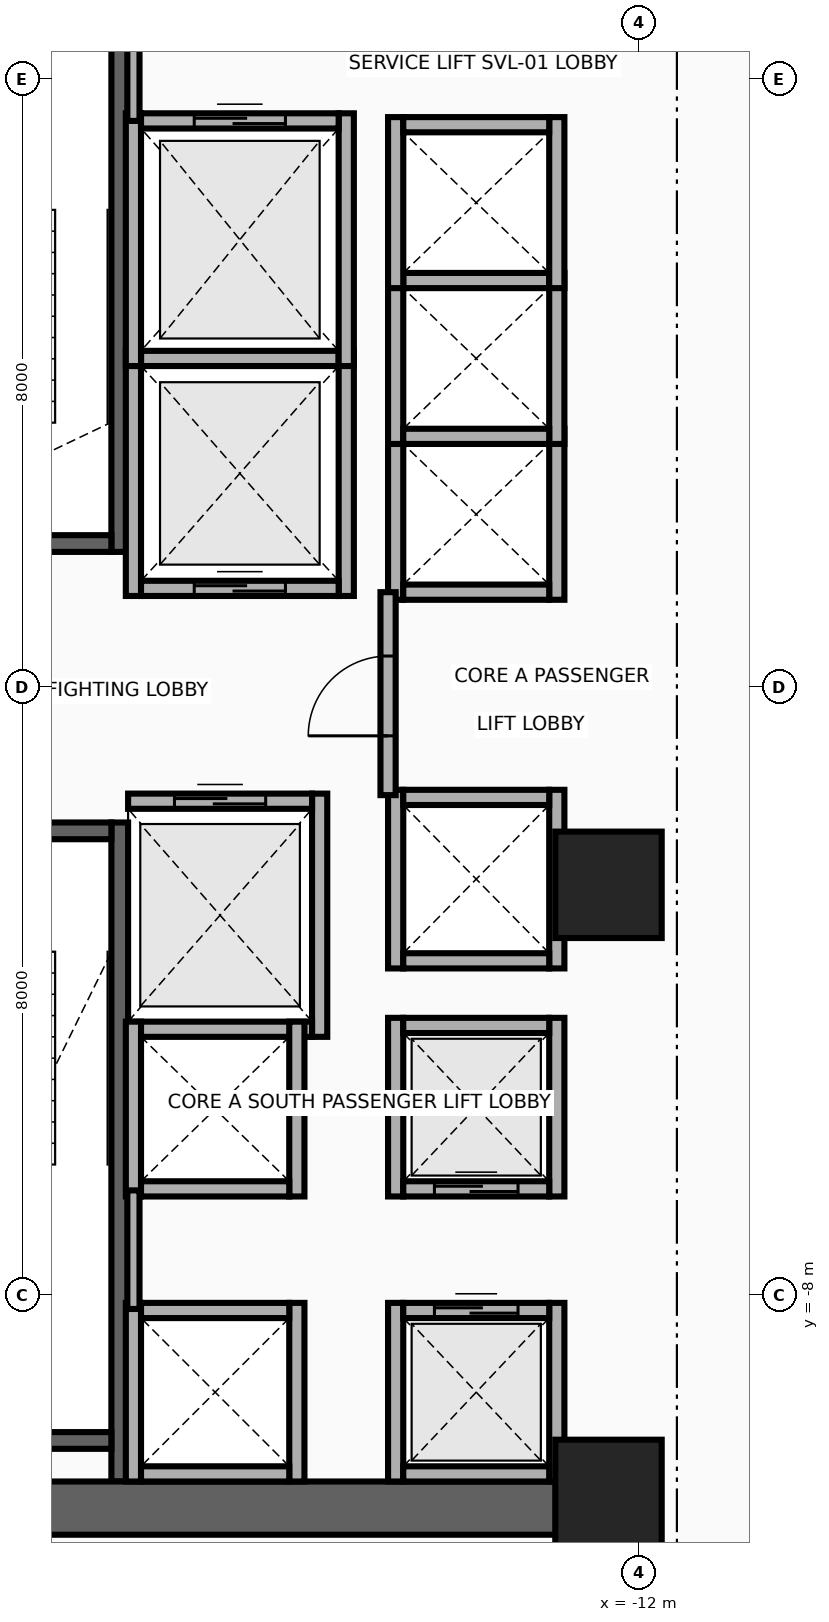
"""IFC4 building model, lengths in metres.
Left out: names, types, materials, properties, quantities, classifications, styles, units other than length and angle.
Written with IfcOpenShell. Run it as: python <this file> out.ifc"""

import sys

from ifc_helpers import new_model, si_unit, direction, frame, frame_2d, origin, origin_2d, place, context, subcontext, project, spatial, rectangle, extrude, source, transform, mapped, element, fill, save


model = new_model("IFC4")
c1 = context("Model", 3, precision=1e-05, world=origin(), true_north=direction((0.0, 1.0)))
c2 = subcontext(c1, "Body", "Model", "MODEL_VIEW")
j1 = project(units=[si_unit("LENGTHUNIT", "METRE"), si_unit("PLANEANGLEUNIT", "RADIAN")], contexts=[c1])
p1 = place(None, origin())
s1 = spatial("IfcSite", under=j1, at=p1, CompositionType="ELEMENT")
p2 = place(p1, origin())
s2 = spatial("IfcBuilding", under=s1, at=p2, CompositionType="ELEMENT")
p3 = place(p2, frame((0.0, 0.0, 48.2)))
s3 = spatial("IfcBuildingStorey", under=s2, at=p3, CompositionType="ELEMENT", Elevation=48.2)
p4 = place(p3, frame((-18.83, 1.78, 0.0), z_axis=(0.0, 0.0, 1.0), x_axis=(0.0, 1.0, 0.0)))
e1 = element("IfcWall", 1, at=p4, inside=s3, PredefinedType="SHEAR", context=c2, shape_type="SweptSolid", body=[
    extrude(rectangle(XDim=8.67, YDim=0.22, at=frame_2d((4.335, 0.0))), origin(), (0.0, 0.0, 1.0), 3.46),
])
p5 = place(p3, frame((-22.05, 1.89, 0.0), z_axis=(0.0, 0.0, 1.0), x_axis=(1.0, 0.0, 0.0)))
e2 = element("IfcWall", 2, at=p5, inside=s3, PredefinedType="SHEAR", context=c2, shape_type="SweptSolid", body=[
    extrude(rectangle(XDim=3.11, YDim=0.22, at=frame_2d((1.555, 0.0))), origin(), (0.0, 0.0, 1.0), 3.46),
])
p6 = place(p5, frame((1.0, 0.0, 0.0)))
e3 = element("IfcOpeningElement", 3, at=p6, cuts=e2, PredefinedType="OPENING", context=c2, shape_type="SweptSolid", body=[
    extrude(rectangle(XDim=1.1, YDim=2.15, at=frame_2d((0.55, 1.075))), frame((0.0, 0.125, 0.0), z_axis=(0.0, -1.0, 0.0), x_axis=(1.0, 0.0, 0.0)), (0.0, 0.0, 1.0), 0.25),
])
p7 = place(p3, frame((-18.83, -10.45, 0.0), z_axis=(0.0, 0.0, 1.0), x_axis=(0.0, 1.0, 0.0)))
e4 = element("IfcWall", 4, at=p7, inside=s3, PredefinedType="SHEAR", context=c2, shape_type="SweptSolid", body=[
    extrude(rectangle(XDim=8.67, YDim=0.22, at=frame_2d((4.335, 0.0))), origin(), (0.0, 0.0, 1.0), 3.46),
])
p8 = place(p3, frame((-22.05, -9.91, 0.0), z_axis=(0.0, 0.0, 1.0), x_axis=(1.0, 0.0, 0.0)))
e5 = element("IfcWall", 5, at=p8, inside=s3, PredefinedType="SHEAR", context=c2, shape_type="SweptSolid", body=[
    extrude(rectangle(XDim=3.11, YDim=0.22, at=frame_2d((1.555, 0.0))), origin(), (0.0, 0.0, 1.0), 3.46),
])
p9 = place(p3, frame((-22.05, -1.89, 0.0), z_axis=(0.0, 0.0, 1.0), x_axis=(1.0, 0.0, 0.0)))
e6 = element("IfcWall", 6, at=p9, inside=s3, PredefinedType="SHEAR", context=c2, shape_type="SweptSolid", body=[
    extrude(rectangle(XDim=3.11, YDim=0.22, at=frame_2d((1.555, 0.0))), origin(), (0.0, 0.0, 1.0), 3.46),
])
p10 = place(p9, frame((1.0, 0.0, 0.0)))
e7 = element("IfcOpeningElement", 7, at=p10, cuts=e6, PredefinedType="OPENING", context=c2, shape_type="SweptSolid", body=[
    extrude(rectangle(XDim=1.1, YDim=2.15, at=frame_2d((0.55, 1.075))), frame((0.0, 0.125, 0.0), z_axis=(0.0, -1.0, 0.0), x_axis=(1.0, 0.0, 0.0)), (0.0, 0.0, 1.0), 0.25),
])
p11 = place(p3, frame((-22.65, -10.8, 0.0), z_axis=(0.0, 0.0, 1.0), x_axis=(1.0, 0.0, 0.0)))
e8 = element("IfcWall", 8, at=p11, inside=s3, PredefinedType="SHEAR", context=c2, shape_type="SweptSolid", body=[
    extrude(rectangle(XDim=10.25, YDim=0.7, at=frame_2d((5.125, 0.0))), origin(), (0.0, 0.0, 1.0), 3.46),
])
m1 = source(origin(), c2, "Body", "SweptSolid", [
    extrude(rectangle(XDim=1.4, YDim=1.4, at=origin_2d()), origin(), (0.0, 0.0, 1.0), 3.7),
])
for number, where, z_axis, x_axis in (
    (9, (-12.4, -10.6, 0.0), (0.0, 0.0, 1.0), (1.0, 0.0, 0.0)),
    (10, (-12.4, -2.6, 0.0), (0.0, 0.0, 1.0), (1.0, 0.0, 0.0)),
):
    element("IfcColumn", number, at=place(p3, frame(where, z_axis=z_axis, x_axis=x_axis)), inside=s3, PredefinedType="COLUMN", context=c2, shape_type="MappedRepresentation", body=[
        mapped(m1, transform((0.0, 0.0, 0.0), x_axis=(1.0, 0.0, 0.0), y_axis=(0.0, 1.0, 0.0), z_axis=(0.0, 0.0, 1.0), scale=1.0)),
    ])
for number, where, z_axis, x_axis in (
    (11, (-18.65, 1.2, 0.0), (0.0, 0.0, 1.0), (0.0, 1.0, 0.0)),
    (12, (-15.85, 1.2, 0.0), (0.0, 0.0, 1.0), (0.0, 1.0, 0.0)),
):
    element("IfcWall", number, at=place(p3, frame(where, z_axis=z_axis, x_axis=x_axis)), inside=s3, PredefinedType="MOVABLE", context=c2, shape_type="SweptSolid", body=[
        extrude(rectangle(XDim=3.225, YDim=0.2, at=frame_2d((1.613, 0.0))), origin(), (0.0, 0.0, 1.0), 3.46),
    ])
p12 = place(p3, frame((-18.55, 1.3, 0.0), z_axis=(0.0, 0.0, 1.0), x_axis=(1.0, 0.0, 0.0)))
e13 = element("IfcWall", 13, at=p12, inside=s3, PredefinedType="MOVABLE", context=c2, shape_type="SweptSolid", body=[
    extrude(rectangle(XDim=2.6, YDim=0.2, at=frame_2d((1.3, 0.0))), origin(), (0.0, 0.0, 1.0), 3.46),
])
p13 = place(p12, frame((0.7, 0.0, 0.0)))
e14 = element("IfcOpeningElement", 14, at=p13, cuts=e13, PredefinedType="OPENING", context=c2, shape_type="SweptSolid", body=[
    extrude(rectangle(XDim=1.2, YDim=2.1, at=frame_2d((0.6, 1.05))), frame((0.0, 0.115, 0.0), z_axis=(0.0, -1.0, 0.0), x_axis=(1.0, 0.0, 0.0)), (0.0, 0.0, 1.0), 0.23),
])
p14 = place(p3, frame((-18.55, 4.325, 0.0), z_axis=(0.0, 0.0, 1.0), x_axis=(1.0, 0.0, 0.0)))
e15 = element("IfcWall", 15, at=p14, inside=s3, PredefinedType="MOVABLE", context=c2, shape_type="SweptSolid", body=[
    extrude(rectangle(XDim=2.6, YDim=0.2, at=frame_2d((1.3, 0.0))), origin(), (0.0, 0.0, 1.0), 3.46),
])
p15 = place(p3, frame((-16.2, -4.6, 0.0), z_axis=(0.0, 0.0, 1.0), x_axis=(0.0, 1.0, 0.0)))
e16 = element("IfcWall", 16, at=p15, inside=s3, PredefinedType="MOVABLE", context=c2, shape_type="SweptSolid", body=[
    extrude(rectangle(XDim=3.2, YDim=0.2, at=frame_2d((1.6, 0.0))), origin(), (0.0, 0.0, 1.0), 3.46),
])
p16 = place(p3, frame((-18.72, -4.5, 0.0), z_axis=(0.0, 0.0, 1.0), x_axis=(1.0, 0.0, 0.0)))
e17 = element("IfcWall", 17, at=p16, inside=s3, PredefinedType="MOVABLE", context=c2, shape_type="SweptSolid", body=[
    extrude(rectangle(XDim=2.42, YDim=0.2, at=frame_2d((1.21, 0.0))), origin(), (0.0, 0.0, 1.0), 3.46),
])
p17 = place(p3, frame((-18.72, -1.5, 0.0), z_axis=(0.0, 0.0, 1.0), x_axis=(1.0, 0.0, 0.0)))
e18 = element("IfcWall", 18, at=p17, inside=s3, PredefinedType="MOVABLE", context=c2, shape_type="SweptSolid", body=[
    extrude(rectangle(XDim=2.42, YDim=0.2, at=frame_2d((1.21, 0.0))), origin(), (0.0, 0.0, 1.0), 3.46),
])
p18 = place(p17, frame((0.61, 0.0, 0.0)))
e19 = element("IfcOpeningElement", 19, at=p18, cuts=e18, PredefinedType="OPENING", context=c2, shape_type="SweptSolid", body=[
    extrude(rectangle(XDim=1.2, YDim=2.1, at=frame_2d((0.6, 1.05))), frame((0.0, 0.115, 0.0), z_axis=(0.0, -1.0, 0.0), x_axis=(1.0, 0.0, 0.0)), (0.0, 0.0, 1.0), 0.23),
])
for number, where, z_axis, x_axis in (
    (20, (-18.65, 4.225, 0.0), (0.0, 0.0, 1.0), (0.0, 1.0, 0.0)),
    (21, (-15.85, 4.225, 0.0), (0.0, 0.0, 1.0), (0.0, 1.0, 0.0)),
):
    element("IfcWall", number, at=place(p3, frame(where, z_axis=z_axis, x_axis=x_axis)), inside=s3, PredefinedType="MOVABLE", context=c2, shape_type="SweptSolid", body=[
        extrude(rectangle(XDim=3.325, YDim=0.2, at=frame_2d((1.663, 0.0))), origin(), (0.0, 0.0, 1.0), 3.46),
    ])
p19 = place(p3, frame((-18.55, 7.45, 0.0), z_axis=(0.0, 0.0, 1.0), x_axis=(1.0, 0.0, 0.0)))
e22 = element("IfcWall", 22, at=p19, inside=s3, PredefinedType="MOVABLE", context=c2, shape_type="SweptSolid", body=[
    extrude(rectangle(XDim=2.6, YDim=0.2, at=frame_2d((1.3, 0.0))), origin(), (0.0, 0.0, 1.0), 3.46),
])
p20 = place(p19, frame((0.7, 0.0, 0.0)))
e23 = element("IfcOpeningElement", 23, at=p20, cuts=e22, PredefinedType="OPENING", context=c2, shape_type="SweptSolid", body=[
    extrude(rectangle(XDim=1.2, YDim=2.1, at=frame_2d((0.6, 1.05))), frame((0.0, 0.115, 0.0), z_axis=(0.0, -1.0, 0.0), x_axis=(1.0, 0.0, 0.0)), (0.0, 0.0, 1.0), 0.23),
])
for number, where, z_axis, x_axis in (
    (24, (-15.2, -10.45, 0.0), (0.0, 0.0, 1.0), (0.0, 1.0, 0.0)),
    (25, (-13.08, -10.45, 0.0), (0.0, 0.0, 1.0), (0.0, 1.0, 0.0)),
):
    element("IfcWall", number, at=place(p3, frame(where, z_axis=z_axis, x_axis=x_axis)), inside=s3, PredefinedType="MOVABLE", context=c2, shape_type="SweptSolid", body=[
        extrude(rectangle(XDim=2.35, YDim=0.2, at=frame_2d((1.175, 0.0))), origin(), (0.0, 0.0, 1.0), 2.583),
    ])
p21 = place(p3, frame((-15.1, -10.35, 0.0), z_axis=(0.0, 0.0, 1.0), x_axis=(1.0, 0.0, 0.0)))
e26 = element("IfcWall", 26, at=p21, inside=s3, PredefinedType="MOVABLE", context=c2, shape_type="SweptSolid", body=[
    extrude(rectangle(XDim=1.92, YDim=0.2, at=frame_2d((0.96, 0.0))), origin(), (0.0, 0.0, 1.0), 2.583),
])
p22 = place(p3, frame((-15.1, -8.2, 0.0), z_axis=(0.0, 0.0, 1.0), x_axis=(1.0, 0.0, 0.0)))
e27 = element("IfcWall", 27, at=p22, inside=s3, PredefinedType="MOVABLE", context=c2, shape_type="SweptSolid", body=[
    extrude(rectangle(XDim=1.92, YDim=0.2, at=frame_2d((0.96, 0.0))), origin(), (0.0, 0.0, 1.0), 3.46),
])
p23 = place(p22, frame((0.41, 0.0, 0.0)))
e28 = element("IfcOpeningElement", 28, at=p23, cuts=e27, PredefinedType="OPENING", context=c2, shape_type="SweptSolid", body=[
    extrude(rectangle(XDim=1.1, YDim=2.1, at=frame_2d((0.55, 1.05))), frame((0.0, 0.115, 0.0), z_axis=(0.0, -1.0, 0.0), x_axis=(1.0, 0.0, 0.0)), (0.0, 0.0, 1.0), 0.23),
])
for number, where, z_axis, x_axis in (
    (29, (-15.2, -6.7, 0.0), (0.0, 0.0, 1.0), (0.0, 1.0, 0.0)),
    (30, (-13.08, -6.7, 0.0), (0.0, 0.0, 1.0), (0.0, 1.0, 0.0)),
):
    element("IfcWall", number, at=place(p3, frame(where, z_axis=z_axis, x_axis=x_axis)), inside=s3, PredefinedType="MOVABLE", context=c2, shape_type="SweptSolid", body=[
        extrude(rectangle(XDim=2.35, YDim=0.2, at=frame_2d((1.175, 0.0))), origin(), (0.0, 0.0, 1.0), 3.46),
    ])
p24 = place(p3, frame((-15.1, -6.6, 0.0), z_axis=(0.0, 0.0, 1.0), x_axis=(1.0, 0.0, 0.0)))
e31 = element("IfcWall", 31, at=p24, inside=s3, PredefinedType="MOVABLE", context=c2, shape_type="SweptSolid", body=[
    extrude(rectangle(XDim=1.92, YDim=0.2, at=frame_2d((0.96, 0.0))), origin(), (0.0, 0.0, 1.0), 3.46),
])
p25 = place(p24, frame((0.41, 0.0, 0.0)))
e32 = element("IfcOpeningElement", 32, at=p25, cuts=e31, PredefinedType="OPENING", context=c2, shape_type="SweptSolid", body=[
    extrude(rectangle(XDim=1.1, YDim=2.1, at=frame_2d((0.55, 1.05))), frame((0.0, 0.115, 0.0), z_axis=(0.0, -1.0, 0.0), x_axis=(1.0, 0.0, 0.0)), (0.0, 0.0, 1.0), 0.23),
])
p26 = place(p3, frame((-15.1, -4.45, 0.0), z_axis=(0.0, 0.0, 1.0), x_axis=(1.0, 0.0, 0.0)))
e33 = element("IfcWall", 33, at=p26, inside=s3, PredefinedType="MOVABLE", context=c2, shape_type="SweptSolid", body=[
    extrude(rectangle(XDim=1.92, YDim=0.2, at=frame_2d((0.96, 0.0))), origin(), (0.0, 0.0, 1.0), 3.46),
])
for number, where, z_axis, x_axis in (
    (34, (-18.65, -10.45, 0.0), (0.0, 0.0, 1.0), (0.0, 1.0, 0.0)),
    (35, (-16.5, -10.45, 0.0), (0.0, 0.0, 1.0), (0.0, 1.0, 0.0)),
):
    element("IfcWall", number, at=place(p3, frame(where, z_axis=z_axis, x_axis=x_axis)), inside=s3, PredefinedType="MOVABLE", context=c2, shape_type="SweptSolid", body=[
        extrude(rectangle(XDim=2.35, YDim=0.2, at=frame_2d((1.175, 0.0))), origin(), (0.0, 0.0, 1.0), 2.583),
    ])
p27 = place(p3, frame((-18.55, -10.35, 0.0), z_axis=(0.0, 0.0, 1.0), x_axis=(1.0, 0.0, 0.0)))
e36 = element("IfcWall", 36, at=p27, inside=s3, PredefinedType="MOVABLE", context=c2, shape_type="SweptSolid", body=[
    extrude(rectangle(XDim=1.95, YDim=0.2, at=frame_2d((0.975, 0.0))), origin(), (0.0, 0.0, 1.0), 2.583),
])
p28 = place(p3, frame((-18.55, -8.2, 0.0), z_axis=(0.0, 0.0, 1.0), x_axis=(1.0, 0.0, 0.0)))
e37 = element("IfcWall", 37, at=p28, inside=s3, PredefinedType="MOVABLE", context=c2, shape_type="SweptSolid", body=[
    extrude(rectangle(XDim=1.95, YDim=0.2, at=frame_2d((0.975, 0.0))), origin(), (0.0, 0.0, 1.0), 3.46),
])
for number, where, z_axis, x_axis in (
    (38, (-15.2, 1.15, 0.0), (0.0, 0.0, 1.0), (0.0, 1.0, 0.0)),
    (39, (-13.08, 1.15, 0.0), (0.0, 0.0, 1.0), (0.0, 1.0, 0.0)),
):
    element("IfcWall", number, at=place(p3, frame(where, z_axis=z_axis, x_axis=x_axis)), inside=s3, PredefinedType="MOVABLE", context=c2, shape_type="SweptSolid", body=[
        extrude(rectangle(XDim=2.25, YDim=0.2, at=frame_2d((1.125, 0.0))), origin(), (0.0, 0.0, 1.0), 3.46),
    ])
p29 = place(p3, frame((-15.1, 1.25, 0.0), z_axis=(0.0, 0.0, 1.0), x_axis=(1.0, 0.0, 0.0)))
e40 = element("IfcWall", 40, at=p29, inside=s3, PredefinedType="MOVABLE", context=c2, shape_type="SweptSolid", body=[
    extrude(rectangle(XDim=1.92, YDim=0.2, at=frame_2d((0.96, 0.0))), origin(), (0.0, 0.0, 1.0), 3.46),
])
for number, where, z_axis, x_axis in (
    (41, (-15.2, 3.2, 0.0), (0.0, 0.0, 1.0), (0.0, 1.0, 0.0)),
    (42, (-13.08, 3.2, 0.0), (0.0, 0.0, 1.0), (0.0, 1.0, 0.0)),
):
    element("IfcWall", number, at=place(p3, frame(where, z_axis=z_axis, x_axis=x_axis)), inside=s3, PredefinedType="MOVABLE", context=c2, shape_type="SweptSolid", body=[
        extrude(rectangle(XDim=2.25, YDim=0.2, at=frame_2d((1.125, 0.0))), origin(), (0.0, 0.0, 1.0), 3.46),
    ])
for number, where, z_axis, x_axis in (
    (43, (-15.1, 3.3, 0.0), (0.0, 0.0, 1.0), (1.0, 0.0, 0.0)),
    (44, (-15.1, 5.35, 0.0), (0.0, 0.0, 1.0), (1.0, 0.0, 0.0)),
):
    element("IfcWall", number, at=place(p3, frame(where, z_axis=z_axis, x_axis=x_axis)), inside=s3, PredefinedType="MOVABLE", context=c2, shape_type="SweptSolid", body=[
        extrude(rectangle(XDim=1.92, YDim=0.2, at=frame_2d((0.96, 0.0))), origin(), (0.0, 0.0, 1.0), 3.46),
    ])
for number, where, z_axis, x_axis in (
    (45, (-15.2, 5.25, 0.0), (0.0, 0.0, 1.0), (0.0, 1.0, 0.0)),
    (46, (-13.08, 5.25, 0.0), (0.0, 0.0, 1.0), (0.0, 1.0, 0.0)),
):
    element("IfcWall", number, at=place(p3, frame(where, z_axis=z_axis, x_axis=x_axis)), inside=s3, PredefinedType="MOVABLE", context=c2, shape_type="SweptSolid", body=[
        extrude(rectangle(XDim=2.25, YDim=0.2, at=frame_2d((1.125, 0.0))), origin(), (0.0, 0.0, 1.0), 3.46),
    ])
p30 = place(p3, frame((-15.1, 7.4, 0.0), z_axis=(0.0, 0.0, 1.0), x_axis=(1.0, 0.0, 0.0)))
e47 = element("IfcWall", 47, at=p30, inside=s3, PredefinedType="MOVABLE", context=c2, shape_type="SweptSolid", body=[
    extrude(rectangle(XDim=1.92, YDim=0.2, at=frame_2d((0.96, 0.0))), origin(), (0.0, 0.0, 1.0), 3.46),
])
for number, where, z_axis, x_axis in (
    (48, (-18.65, -6.7, 0.0), (0.0, 0.0, 1.0), (0.0, 1.0, 0.0)),
    (49, (-16.5, -6.7, 0.0), (0.0, 0.0, 1.0), (0.0, 1.0, 0.0)),
):
    element("IfcWall", number, at=place(p3, frame(where, z_axis=z_axis, x_axis=x_axis)), inside=s3, PredefinedType="MOVABLE", context=c2, shape_type="SweptSolid", body=[
        extrude(rectangle(XDim=2.3, YDim=0.2, at=frame_2d((1.15, 0.0))), origin(), (0.0, 0.0, 1.0), 3.46),
    ])
p31 = place(p3, frame((-18.55, -6.6, 0.0), z_axis=(0.0, 0.0, 1.0), x_axis=(1.0, 0.0, 0.0)))
e50 = element("IfcWall", 50, at=p31, inside=s3, PredefinedType="MOVABLE", context=c2, shape_type="SweptSolid", body=[
    extrude(rectangle(XDim=1.95, YDim=0.2, at=frame_2d((0.975, 0.0))), origin(), (0.0, 0.0, 1.0), 3.46),
])
for number, where, z_axis, x_axis in (
    (51, (-15.2, -3.7, 0.0), (0.0, 0.0, 1.0), (0.0, 1.0, 0.0)),
    (52, (-13.08, -3.7, 0.0), (0.0, 0.0, 1.0), (0.0, 1.0, 0.0)),
):
    element("IfcWall", number, at=place(p3, frame(where, z_axis=z_axis, x_axis=x_axis)), inside=s3, PredefinedType="MOVABLE", context=c2, shape_type="SweptSolid", body=[
        extrude(rectangle(XDim=2.35, YDim=0.2, at=frame_2d((1.175, 0.0))), origin(), (0.0, 0.0, 1.0), 3.46),
    ])
for number, where, z_axis, x_axis in (
    (53, (-15.1, -3.6, 0.0), (0.0, 0.0, 1.0), (1.0, 0.0, 0.0)),
    (54, (-15.1, -1.45, 0.0), (0.0, 0.0, 1.0), (1.0, 0.0, 0.0)),
):
    element("IfcWall", number, at=place(p3, frame(where, z_axis=z_axis, x_axis=x_axis)), inside=s3, PredefinedType="MOVABLE", context=c2, shape_type="SweptSolid", body=[
        extrude(rectangle(XDim=1.92, YDim=0.2, at=frame_2d((0.96, 0.0))), origin(), (0.0, 0.0, 1.0), 3.46),
    ])
p32 = place(p3, frame((-15.3, -1.42, 0.0), z_axis=(0.0, 0.0, 1.0), x_axis=(0.0, 1.0, 0.0)))
e55 = element("IfcWall", 55, at=p32, inside=s3, PredefinedType="PARTITIONING", context=c2, shape_type="SweptSolid", body=[
    extrude(rectangle(XDim=2.67, YDim=0.2, at=frame_2d((1.335, 0.0))), origin(), (0.0, 0.0, 1.0), 3.46),
])
p33 = place(p32, frame((0.78, 0.0, 0.0)))
e56 = element("IfcOpeningElement", 56, at=p33, cuts=e55, PredefinedType="OPENING", context=c2, shape_type="SweptSolid", body=[
    extrude(rectangle(XDim=1.05, YDim=2.15, at=frame_2d((0.525, 1.075))), frame((0.0, 0.115, 0.0), z_axis=(0.0, -1.0, 0.0), x_axis=(1.0, 0.0, 0.0)), (0.0, 0.0, 1.0), 0.23),
])
p34 = place(p3, frame((-18.65, 7.45, 0.0), z_axis=(0.0, 0.0, 1.0), x_axis=(0.0, 1.0, 0.0)))
e57 = element("IfcWall", 57, at=p34, inside=s3, PredefinedType="PARTITIONING", context=c2, shape_type="SweptSolid", body=[
    extrude(rectangle(XDim=2.93, YDim=0.16, at=frame_2d((1.465, 0.0))), origin(), (0.0, 0.0, 1.0), 3.46),
])
p35 = place(p3, frame((-18.65, -8.18, 0.0), z_axis=(0.0, 0.0, 1.0), x_axis=(0.0, 1.0, 0.0)))
e58 = element("IfcWall", 58, at=p35, inside=s3, PredefinedType="PARTITIONING", context=c2, shape_type="SweptSolid", body=[
    extrude(rectangle(XDim=1.56, YDim=0.16, at=frame_2d((0.78, 0.0))), origin(), (0.0, 0.0, 1.0), 3.46),
])
p36 = place(p13, origin())
e59 = element("IfcDoor", 59, at=p36, inside=s3, OperationType="DOUBLE_DOOR_SLIDING", PredefinedType="DOOR", context=c2, shape_type="SweptSolid", body=[
    extrude(rectangle(XDim=1.2, YDim=2.1, at=frame_2d((0.6, 1.05))), frame((0.0, 0.025, 0.0), z_axis=(0.0, -1.0, 0.0), x_axis=(1.0, 0.0, 0.0)), (0.0, 0.0, 1.0), 0.05),
])
fill(e14, e59)
p37 = place(p18, origin())
e60 = element("IfcDoor", 60, at=p37, inside=s3, OperationType="DOUBLE_DOOR_SLIDING", PredefinedType="DOOR", context=c2, shape_type="SweptSolid", body=[
    extrude(rectangle(XDim=1.2, YDim=2.1, at=frame_2d((0.6, 1.05))), frame((0.0, 0.025, 0.0), z_axis=(0.0, -1.0, 0.0), x_axis=(1.0, 0.0, 0.0)), (0.0, 0.0, 1.0), 0.05),
])
fill(e19, e60)
p38 = place(p20, origin())
e61 = element("IfcDoor", 61, at=p38, inside=s3, OperationType="DOUBLE_DOOR_SLIDING", PredefinedType="DOOR", context=c2, shape_type="SweptSolid", body=[
    extrude(rectangle(XDim=1.2, YDim=2.1, at=frame_2d((0.6, 1.05))), frame((0.0, 0.025, 0.0), z_axis=(0.0, -1.0, 0.0), x_axis=(1.0, 0.0, 0.0)), (0.0, 0.0, 1.0), 0.05),
])
fill(e23, e61)
p39 = place(p23, origin())
e62 = element("IfcDoor", 62, at=p39, inside=s3, OperationType="DOUBLE_DOOR_SLIDING", PredefinedType="DOOR", context=c2, shape_type="SweptSolid", body=[
    extrude(rectangle(XDim=1.1, YDim=2.1, at=frame_2d((0.55, 1.05))), frame((0.0, 0.025, 0.0), z_axis=(0.0, -1.0, 0.0), x_axis=(1.0, 0.0, 0.0)), (0.0, 0.0, 1.0), 0.05),
])
fill(e28, e62)
p40 = place(p25, origin())
e63 = element("IfcDoor", 63, at=p40, inside=s3, OperationType="DOUBLE_DOOR_SLIDING", PredefinedType="DOOR", context=c2, shape_type="SweptSolid", body=[
    extrude(rectangle(XDim=1.1, YDim=2.1, at=frame_2d((0.55, 1.05))), frame((0.0, 0.025, 0.0), z_axis=(0.0, -1.0, 0.0), x_axis=(1.0, 0.0, 0.0)), (0.0, 0.0, 1.0), 0.05),
])
fill(e32, e63)
p41 = place(p33, origin())
e64 = element("IfcDoor", 64, at=p41, inside=s3, OperationType="SINGLE_SWING_RIGHT", PredefinedType="DOOR", context=c2, shape_type="SweptSolid", body=[
    extrude(rectangle(XDim=1.05, YDim=2.15, at=frame_2d((0.525, 1.075))), frame((0.0, 0.025, 0.0), z_axis=(0.0, -1.0, 0.0), x_axis=(1.0, 0.0, 0.0)), (0.0, 0.0, 1.0), 0.05),
])
fill(e56, e64)
save(model, sys.argv[1])
